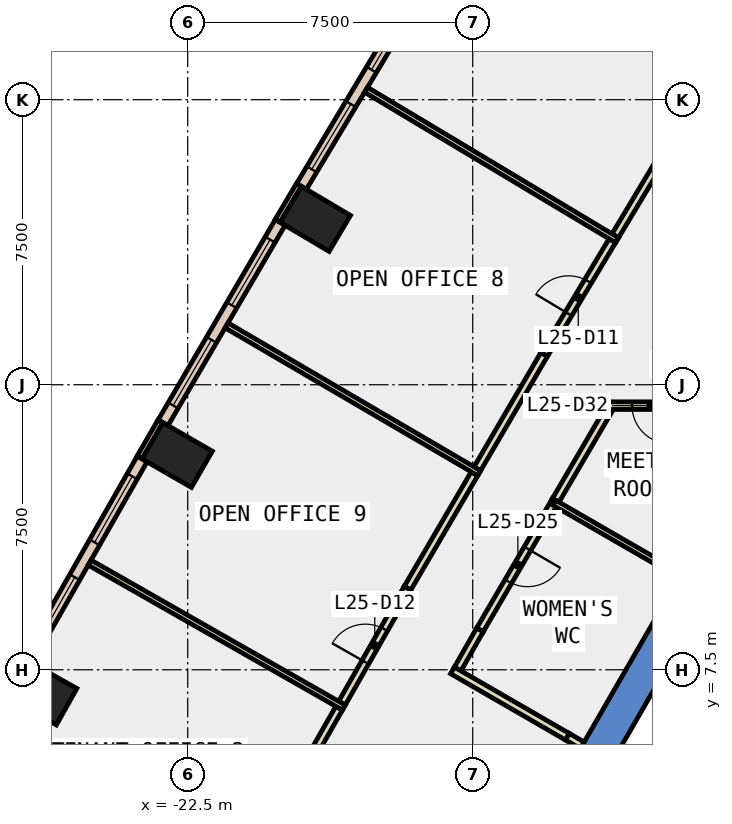
"""IFC4 building model, lengths in metres.
Left out: names, types, materials, properties, quantities, classifications, styles, units other than length and angle.
Written with IfcOpenShell. Run it as: python <this file> out.ifc"""

import sys

from ifc_helpers import new_model, si_unit, direction, frame, frame_2d, origin, origin_2d, place, context, subcontext, project, spatial, polyline, rectangle, outline, extrude, element, fill, save


model = new_model("IFC4")
c1 = context("Model", 3, precision=1e-05, world=origin(), true_north=direction((0.0, 1.0)))
c2 = subcontext(c1, "Body", "Model", "MODEL_VIEW")
j1 = project(units=[si_unit("LENGTHUNIT", "METRE"), si_unit("PLANEANGLEUNIT", "RADIAN")], contexts=[c1])
p1 = place(None, origin())
s1 = spatial("IfcSite", under=j1, at=p1, CompositionType="ELEMENT")
p2 = place(p1, origin())
s2 = spatial("IfcBuilding", under=s1, at=p2, CompositionType="ELEMENT")
p3 = place(p2, frame((0.0, 0.0, 116.0)))
s3 = spatial("IfcBuildingStorey", under=s2, at=p3, CompositionType="ELEMENT", Elevation=116.0)
for number, where, z_axis, x_axis in (
    (1, (-19.143, 19.364, -0.4), (0.0, 0.0, 1.0), (0.51, 0.86, 0.0)),
    (2, (-22.777, 13.15, -0.4), (0.0, 0.0, 1.0), (0.5, 0.866, 0.0)),
    (3, (-26.341, 6.896, -0.4), (0.0, 0.0, 1.0), (0.49, 0.872, 0.0)),
):
    element("IfcColumn", number, at=place(p3, frame(where, z_axis=z_axis, x_axis=x_axis)), inside=s3, PredefinedType="COLUMN", context=c2, shape_type="SweptSolid", body=[
        extrude(rectangle(XDim=1.1, YDim=1.5, at=origin_2d()), origin(), (0.0, 0.0, 1.0), 4.2),
    ])
p4 = place(p3, frame((0.0, 0.0, -0.4)))
e4 = element("IfcWall", 4, at=p4, inside=s3, PredefinedType="SHEAR", context=c2, shape_type="SweptSolid", body=[
    extrude(outline(polyline([(-12.267, 5.252), (-11.488, 4.802), (-6.409, 13.6), (-6.928, 14.5), (-12.267, 5.252)])), origin(), (0.0, 0.0, 1.0), 4.2),
])
p5 = place(p3, frame((-19.572, 20.258, 0.0), z_axis=(0.0, 0.0, 1.0), x_axis=(-0.510082245696, -0.860125631885, 0.0)))
e5 = element("IfcWall", 5, at=p5, inside=s3, PredefinedType="STANDARD", context=c2, shape_type="SweptSolid", body=[
    extrude(rectangle(XDim=1.1, YDim=0.15, at=frame_2d((0.55, 0.0))), origin(), (0.0, 0.0, 1.0), 3.8),
])
p6 = place(p3, frame((-23.216, 14.039, 0.0), z_axis=(0.0, 0.0, 1.0), x_axis=(-0.499837685251, -0.86611909597, 0.0)))
e6 = element("IfcWall", 6, at=p6, inside=s3, PredefinedType="STANDARD", context=c2, shape_type="SweptSolid", body=[
    extrude(rectangle(XDim=1.1, YDim=0.15, at=frame_2d((0.55, 0.0))), origin(), (0.0, 0.0, 1.0), 3.8),
])
p7 = place(p3, frame((-16.365, 25.458, 0.0), z_axis=(0.0, 0.0, 1.0), x_axis=(-0.514078503149, -0.857743139057, 0.0)))
e7 = element("IfcWall", 7, at=p7, inside=s3, PredefinedType="STANDARD", context=c2, shape_type="SweptSolid", body=[
    extrude(rectangle(XDim=6.11, YDim=0.3, at=frame_2d((3.055, 0.0))), origin(), (0.0, 0.0, 1.0), 3.8),
])
p8 = place(p7, frame((0.528, 0.0, 0.9)))
e8 = element("IfcOpeningElement", 8, at=p8, cuts=e7, PredefinedType="OPENING", context=c2, shape_type="SweptSolid", body=[
    extrude(rectangle(XDim=2.0, YDim=2.6, at=frame_2d((1.0, 1.3))), frame((0.0, 0.16, 0.0), z_axis=(0.0, -1.0, 0.0), x_axis=(1.0, 0.0, 0.0)), (0.0, 0.0, 1.0), 0.32),
])
p9 = place(p7, frame((3.583, 0.0, 0.9)))
e9 = element("IfcOpeningElement", 9, at=p9, cuts=e7, PredefinedType="OPENING", context=c2, shape_type="SweptSolid", body=[
    extrude(rectangle(XDim=2.0, YDim=2.6, at=frame_2d((1.0, 1.3))), frame((0.0, 0.16, 0.0), z_axis=(0.0, -1.0, 0.0), x_axis=(1.0, 0.0, 0.0)), (0.0, 0.0, 1.0), 0.32),
])
p10 = place(p3, frame((-20.065, 19.273, 0.0), z_axis=(0.0, 0.0, 1.0), x_axis=(-0.504790055126, -0.863242144619, 0.0)))
e10 = element("IfcWall", 10, at=p10, inside=s3, PredefinedType="STANDARD", context=c2, shape_type="SweptSolid", body=[
    extrude(rectangle(XDim=6.109, YDim=0.3, at=frame_2d((3.055, 0.0))), origin(), (0.0, 0.0, 1.0), 3.8),
])
p11 = place(p10, frame((0.527, 0.0, 0.9)))
e11 = element("IfcOpeningElement", 11, at=p11, cuts=e10, PredefinedType="OPENING", context=c2, shape_type="SweptSolid", body=[
    extrude(rectangle(XDim=2.0, YDim=2.6, at=frame_2d((1.0, 1.3))), frame((0.0, 0.16, 0.0), z_axis=(0.0, -1.0, 0.0), x_axis=(1.0, 0.0, 0.0)), (0.0, 0.0, 1.0), 0.32),
])
p12 = place(p10, frame((3.582, 0.0, 0.9)))
e12 = element("IfcOpeningElement", 12, at=p12, cuts=e10, PredefinedType="OPENING", context=c2, shape_type="SweptSolid", body=[
    extrude(rectangle(XDim=2.0, YDim=2.6, at=frame_2d((1.0, 1.3))), frame((0.0, 0.16, 0.0), z_axis=(0.0, -1.0, 0.0), x_axis=(1.0, 0.0, 0.0)), (0.0, 0.0, 1.0), 0.32),
])
p13 = place(p3, frame((-23.698, 13.048, 0.0), z_axis=(0.0, 0.0, 1.0), x_axis=(-0.495114366991, -0.868827810098, 0.0)))
e13 = element("IfcWall", 13, at=p13, inside=s3, PredefinedType="STANDARD", context=c2, shape_type="SweptSolid", body=[
    extrude(rectangle(XDim=6.11, YDim=0.3, at=frame_2d((3.055, 0.0))), origin(), (0.0, 0.0, 1.0), 3.8),
])
p14 = place(p13, frame((0.527, 0.0, 0.9)))
e14 = element("IfcOpeningElement", 14, at=p14, cuts=e13, PredefinedType="OPENING", context=c2, shape_type="SweptSolid", body=[
    extrude(rectangle(XDim=2.0, YDim=2.6, at=frame_2d((1.0, 1.3))), frame((0.0, 0.16, 0.0), z_axis=(0.0, -1.0, 0.0), x_axis=(1.0, 0.0, 0.0)), (0.0, 0.0, 1.0), 0.32),
])
p15 = place(p13, frame((3.582, 0.0, 0.9)))
e15 = element("IfcOpeningElement", 15, at=p15, cuts=e13, PredefinedType="OPENING", context=c2, shape_type="SweptSolid", body=[
    extrude(rectangle(XDim=2.0, YDim=2.6, at=frame_2d((1.0, 1.3))), frame((0.0, 0.16, 0.0), z_axis=(0.0, -1.0, 0.0), x_axis=(1.0, 0.0, 0.0)), (0.0, 0.0, 1.0), 0.32),
])
p16 = place(p3, frame((-11.409, 14.364, 0.0), z_axis=(0.0, 0.0, 1.0), x_axis=(-0.504846343003, -0.863209227219, 0.0)))
e16 = element("IfcWall", 16, at=p16, inside=s3, PredefinedType="PARTITIONING", context=c2, shape_type="SweptSolid", body=[
    extrude(rectangle(XDim=2.785, YDim=0.2, at=frame_2d((1.393, 0.0))), origin(), (0.0, 0.0, 1.0), 3.8),
])
p17 = place(p3, frame((-12.815, 11.96, 0.0), z_axis=(0.0, 0.0, 1.0), x_axis=(-0.5048198861, -0.863224699946, 0.0)))
e17 = element("IfcWall", 17, at=p17, inside=s3, PredefinedType="PARTITIONING", context=c2, shape_type="SweptSolid", body=[
    extrude(rectangle(XDim=3.95, YDim=0.2, at=frame_2d((1.975, 0.0))), origin(), (0.0, 0.0, 1.0), 3.8),
])
p18 = place(p17, frame((1.475, 0.0, 0.0)))
e18 = element("IfcOpeningElement", 18, at=p18, cuts=e17, PredefinedType="OPENING", context=c2, shape_type="SweptSolid", body=[
    extrude(rectangle(XDim=1.0, YDim=2.1, at=frame_2d((0.5, 1.05))), frame((0.0, 0.11, 0.0), z_axis=(0.0, -1.0, 0.0), x_axis=(1.0, 0.0, 0.0)), (0.0, 0.0, 1.0), 0.22),
])
p19 = place(p3, frame((-14.809, 8.55, 0.0), z_axis=(0.0, 0.0, 1.0), x_axis=(-0.495074026382, -0.868850797549, 0.0)))
e19 = element("IfcWall", 19, at=p19, inside=s3, PredefinedType="PARTITIONING", context=c2, shape_type="SweptSolid", body=[
    extrude(rectangle(XDim=1.186, YDim=0.2, at=frame_2d((0.593, 0.0))), origin(), (0.0, 0.0, 1.0), 3.8),
])
p20 = place(p3, frame((-15.532, 7.484, 0.0), z_axis=(0.0, 0.0, 1.0), x_axis=(0.866045954906, -0.499964402723, 0.0)))
e20 = element("IfcWall", 20, at=p20, inside=s3, PredefinedType="PARTITIONING", context=c2, shape_type="SweptSolid", body=[
    extrude(rectangle(XDim=3.494, YDim=0.2, at=frame_2d((1.747, 0.0))), origin(), (0.0, 0.0, 1.0), 3.8),
])
for number, where, z_axis, x_axis in (
    (21, (-11.249, 18.918, 0.0), (0.0, 0.0, 1.0), (0.514, 0.858, 0.0)),
    (22, (-14.879, 12.789, 0.0), (0.0, 0.0, 1.0), (0.505, 0.863, 0.0)),
):
    element("IfcWall", number, at=place(p3, frame(where, z_axis=z_axis, x_axis=x_axis)), inside=s3, PredefinedType="PARTITIONING", context=c2, shape_type="SweptSolid", body=[
        extrude(rectangle(XDim=3.487, YDim=0.2, at=frame_2d((1.743, 0.0))), origin(), (0.0, 0.0, 1.0), 3.8),
    ])
p21 = place(p3, frame((-13.119, 15.799, 0.0), z_axis=(0.0, 0.0, 1.0), x_axis=(0.514155958966, 0.857696712049, 0.0)))
e23 = element("IfcWall", 23, at=p21, inside=s3, PredefinedType="PARTITIONING", context=c2, shape_type="SweptSolid", body=[
    extrude(rectangle(XDim=3.487, YDim=0.2, at=frame_2d((1.744, 0.0))), origin(), (0.0, 0.0, 1.0), 3.8),
])
p22 = place(p21, frame((1.244, 0.0, 0.0)))
e24 = element("IfcOpeningElement", 24, at=p22, cuts=e23, PredefinedType="OPENING", context=c2, shape_type="SweptSolid", body=[
    extrude(rectangle(XDim=1.0, YDim=2.1, at=frame_2d((0.5, 1.05))), frame((0.0, 0.11, 0.0), z_axis=(0.0, -1.0, 0.0), x_axis=(1.0, 0.0, 0.0)), (0.0, 0.0, 1.0), 0.22),
])
p23 = place(p3, frame((-18.441, 6.621, 0.0), z_axis=(0.0, 0.0, 1.0), x_axis=(0.495286549488, 0.868729666753, 0.0)))
e25 = element("IfcWall", 25, at=p23, inside=s3, PredefinedType="PARTITIONING", context=c2, shape_type="SweptSolid", body=[
    extrude(rectangle(XDim=3.487, YDim=0.2, at=frame_2d((1.743, 0.0))), origin(), (0.0, 0.0, 1.0), 3.8),
])
p24 = place(p23, frame((1.243, 0.0, 0.0)))
e26 = element("IfcOpeningElement", 26, at=p24, cuts=e25, PredefinedType="OPENING", context=c2, shape_type="SweptSolid", body=[
    extrude(rectangle(XDim=1.0, YDim=2.1, at=frame_2d((0.5, 1.05))), frame((0.0, 0.11, 0.0), z_axis=(0.0, -1.0, 0.0), x_axis=(1.0, 0.0, 0.0)), (0.0, 0.0, 1.0), 0.22),
])
p25 = place(p3, frame((-16.714, 9.65, 0.0), z_axis=(0.0, 0.0, 1.0), x_axis=(0.504885284202, 0.863186451351, 0.0)))
e27 = element("IfcWall", 27, at=p25, inside=s3, PredefinedType="PARTITIONING", context=c2, shape_type="SweptSolid", body=[
    extrude(rectangle(XDim=3.486, YDim=0.2, at=frame_2d((1.743, 0.0))), origin(), (0.0, 0.0, 1.0), 3.8),
])
p26 = place(p3, frame((-20.242, 3.462, 0.0), z_axis=(0.0, 0.0, 1.0), x_axis=(0.495309264725, 0.868716715781, 0.0)))
e28 = element("IfcWall", 28, at=p26, inside=s3, PredefinedType="PARTITIONING", context=c2, shape_type="SweptSolid", body=[
    extrude(rectangle(XDim=3.487, YDim=0.2, at=frame_2d((1.743, 0.0))), origin(), (0.0, 0.0, 1.0), 3.8),
])
p27 = place(p3, frame((-9.537, 9.981, 0.0), z_axis=(0.0, 0.0, 1.0), x_axis=(-0.866068787954, 0.499924848885, 0.0)))
e29 = element("IfcWall", 29, at=p27, inside=s3, PredefinedType="PARTITIONING", context=c2, shape_type="SweptSolid", body=[
    extrude(rectangle(XDim=3.829, YDim=0.15, at=frame_2d((1.914, 0.0))), origin(), (0.0, 0.0, 1.0), 3.8),
])
p28 = place(p3, frame((-6.957, 14.45, 0.0), z_axis=(0.0, 0.0, 1.0), x_axis=(-1.0, 0.0, 0.0)))
e30 = element("IfcWall", 30, at=p28, inside=s3, PredefinedType="PARTITIONING", context=c2, shape_type="SweptSolid", body=[
    extrude(rectangle(XDim=4.502, YDim=0.2, at=frame_2d((2.251, 0.0))), origin(), (0.0, 0.0, 1.0), 3.8),
])
p29 = place(p28, frame((1.751, 0.0, 0.0)))
e31 = element("IfcOpeningElement", 31, at=p29, cuts=e30, PredefinedType="OPENING", context=c2, shape_type="SweptSolid", body=[
    extrude(rectangle(XDim=1.0, YDim=2.1, at=frame_2d((0.5, 1.05))), frame((0.0, 0.11, 0.0), z_axis=(0.0, -1.0, 0.0), x_axis=(1.0, 0.0, 0.0)), (0.0, 0.0, 1.0), 0.22),
])
p30 = place(p28, frame((2.851, 0.0, 0.0)))
e32 = element("IfcOpeningElement", 32, at=p30, cuts=e30, PredefinedType="OPENING", context=c2, shape_type="SweptSolid", body=[
    extrude(rectangle(XDim=1.0, YDim=2.1, at=frame_2d((0.5, 1.05))), frame((0.0, 0.11, 0.0), z_axis=(0.0, -1.0, 0.0), x_axis=(1.0, 0.0, 0.0)), (0.0, 0.0, 1.0), 0.22),
])
p31 = place(p3, frame((-11.202, 18.803, 0.0), z_axis=(0.0, 0.0, 1.0), x_axis=(-0.857778149162, 0.514020084062, 0.0)))
e33 = element("IfcWall", 33, at=p31, inside=s3, PredefinedType="PARTITIONING", context=c2, shape_type="SweptSolid", body=[
    extrude(rectangle(XDim=7.7, YDim=0.15, at=frame_2d((3.85, 0.0))), origin(), (0.0, 0.0, 1.0), 3.8),
])
p32 = place(p3, frame((-14.83, 12.674, 0.0), z_axis=(0.0, 0.0, 1.0), x_axis=(-0.863237916953, 0.504797284794, 0.0)))
e34 = element("IfcWall", 34, at=p32, inside=s3, PredefinedType="PARTITIONING", context=c2, shape_type="SweptSolid", body=[
    extrude(rectangle(XDim=7.7, YDim=0.15, at=frame_2d((3.85, 0.0))), origin(), (0.0, 0.0, 1.0), 3.8),
])
p33 = place(p3, frame((-18.391, 6.506, 0.0), z_axis=(0.0, 0.0, 1.0), x_axis=(-0.868738258528, 0.495271479261, 0.0)))
e35 = element("IfcWall", 35, at=p33, inside=s3, PredefinedType="PARTITIONING", context=c2, shape_type="SweptSolid", body=[
    extrude(rectangle(XDim=7.701, YDim=0.15, at=frame_2d((3.85, 0.0))), origin(), (0.0, 0.0, 1.0), 3.8),
])
p34 = place(p3, frame((-12.506, 5.737, 0.0), z_axis=(0.0, 0.0, 1.0), x_axis=(0.865624510465, -0.500693725627, 0.0)))
e36 = element("IfcWall", 36, at=p34, inside=s3, PredefinedType="PARTITIONING", context=c2, shape_type="SweptSolid", body=[
    extrude(rectangle(XDim=0.449, YDim=0.2, at=frame_2d((0.225, 0.0))), origin(), (0.0, 0.0, 1.0), 2.4),
])
p35 = place(p8, origin())
e37 = element("IfcWindow", 37, at=p35, inside=s3, PartitioningType="SINGLE_PANEL", PredefinedType="WINDOW", context=c2, shape_type="SweptSolid", body=[
    extrude(rectangle(XDim=2.0, YDim=2.6, at=frame_2d((1.0, 1.3))), frame((0.0, 0.03, 0.0), z_axis=(0.0, -1.0, 0.0), x_axis=(1.0, 0.0, 0.0)), (0.0, 0.0, 1.0), 0.06),
])
fill(e8, e37)
p36 = place(p9, origin())
e38 = element("IfcWindow", 38, at=p36, inside=s3, PartitioningType="SINGLE_PANEL", PredefinedType="WINDOW", context=c2, shape_type="SweptSolid", body=[
    extrude(rectangle(XDim=2.0, YDim=2.6, at=frame_2d((1.0, 1.3))), frame((0.0, 0.03, 0.0), z_axis=(0.0, -1.0, 0.0), x_axis=(1.0, 0.0, 0.0)), (0.0, 0.0, 1.0), 0.06),
])
fill(e9, e38)
p37 = place(p11, origin())
e39 = element("IfcWindow", 39, at=p37, inside=s3, PartitioningType="SINGLE_PANEL", PredefinedType="WINDOW", context=c2, shape_type="SweptSolid", body=[
    extrude(rectangle(XDim=2.0, YDim=2.6, at=frame_2d((1.0, 1.3))), frame((0.0, 0.03, 0.0), z_axis=(0.0, -1.0, 0.0), x_axis=(1.0, 0.0, 0.0)), (0.0, 0.0, 1.0), 0.06),
])
fill(e11, e39)
p38 = place(p12, origin())
e40 = element("IfcWindow", 40, at=p38, inside=s3, PartitioningType="SINGLE_PANEL", PredefinedType="WINDOW", context=c2, shape_type="SweptSolid", body=[
    extrude(rectangle(XDim=2.0, YDim=2.6, at=frame_2d((1.0, 1.3))), frame((0.0, 0.03, 0.0), z_axis=(0.0, -1.0, 0.0), x_axis=(1.0, 0.0, 0.0)), (0.0, 0.0, 1.0), 0.06),
])
fill(e12, e40)
p39 = place(p14, origin())
e41 = element("IfcWindow", 41, at=p39, inside=s3, PartitioningType="SINGLE_PANEL", PredefinedType="WINDOW", context=c2, shape_type="SweptSolid", body=[
    extrude(rectangle(XDim=2.0, YDim=2.6, at=frame_2d((1.0, 1.3))), frame((0.0, 0.03, 0.0), z_axis=(0.0, -1.0, 0.0), x_axis=(1.0, 0.0, 0.0)), (0.0, 0.0, 1.0), 0.06),
])
fill(e14, e41)
p40 = place(p15, origin())
e42 = element("IfcWindow", 42, at=p40, inside=s3, PartitioningType="SINGLE_PANEL", PredefinedType="WINDOW", context=c2, shape_type="SweptSolid", body=[
    extrude(rectangle(XDim=2.0, YDim=2.6, at=frame_2d((1.0, 1.3))), frame((0.0, 0.03, 0.0), z_axis=(0.0, -1.0, 0.0), x_axis=(1.0, 0.0, 0.0)), (0.0, 0.0, 1.0), 0.06),
])
fill(e15, e42)
p41 = place(p22, origin())
e43 = element("IfcDoor", 43, at=p41, inside=s3, OperationType="SINGLE_SWING_LEFT", PredefinedType="DOOR", context=c2, shape_type="SweptSolid", body=[
    extrude(rectangle(XDim=1.0, YDim=2.1, at=frame_2d((0.5, 1.05))), frame((0.0, 0.025, 0.0), z_axis=(0.0, -1.0, 0.0), x_axis=(1.0, 0.0, 0.0)), (0.0, 0.0, 1.0), 0.05),
])
fill(e24, e43)
p42 = place(p24, origin())
e44 = element("IfcDoor", 44, at=p42, inside=s3, OperationType="SINGLE_SWING_RIGHT", PredefinedType="DOOR", context=c2, shape_type="SweptSolid", body=[
    extrude(rectangle(XDim=1.0, YDim=2.1, at=frame_2d((0.5, 1.05))), frame((0.0, 0.025, 0.0), z_axis=(0.0, -1.0, 0.0), x_axis=(1.0, 0.0, 0.0)), (0.0, 0.0, 1.0), 0.05),
])
fill(e26, e44)
p43 = place(p18, origin())
e45 = element("IfcDoor", 45, at=p43, inside=s3, OperationType="SINGLE_SWING_RIGHT", PredefinedType="DOOR", context=c2, shape_type="SweptSolid", body=[
    extrude(rectangle(XDim=1.0, YDim=2.1, at=frame_2d((0.5, 1.05))), frame((0.0, 0.025, 0.0), z_axis=(0.0, -1.0, 0.0), x_axis=(1.0, 0.0, 0.0)), (0.0, 0.0, 1.0), 0.05),
])
fill(e18, e45)
p44 = place(p30, origin())
e46 = element("IfcDoor", 46, at=p44, inside=s3, OperationType="SINGLE_SWING_RIGHT", PredefinedType="DOOR", context=c2, shape_type="SweptSolid", body=[
    extrude(rectangle(XDim=1.0, YDim=2.1, at=frame_2d((0.5, 1.05))), frame((0.0, 0.025, 0.0), z_axis=(0.0, -1.0, 0.0), x_axis=(1.0, 0.0, 0.0)), (0.0, 0.0, 1.0), 0.05),
])
fill(e32, e46)
save(model, sys.argv[1])
